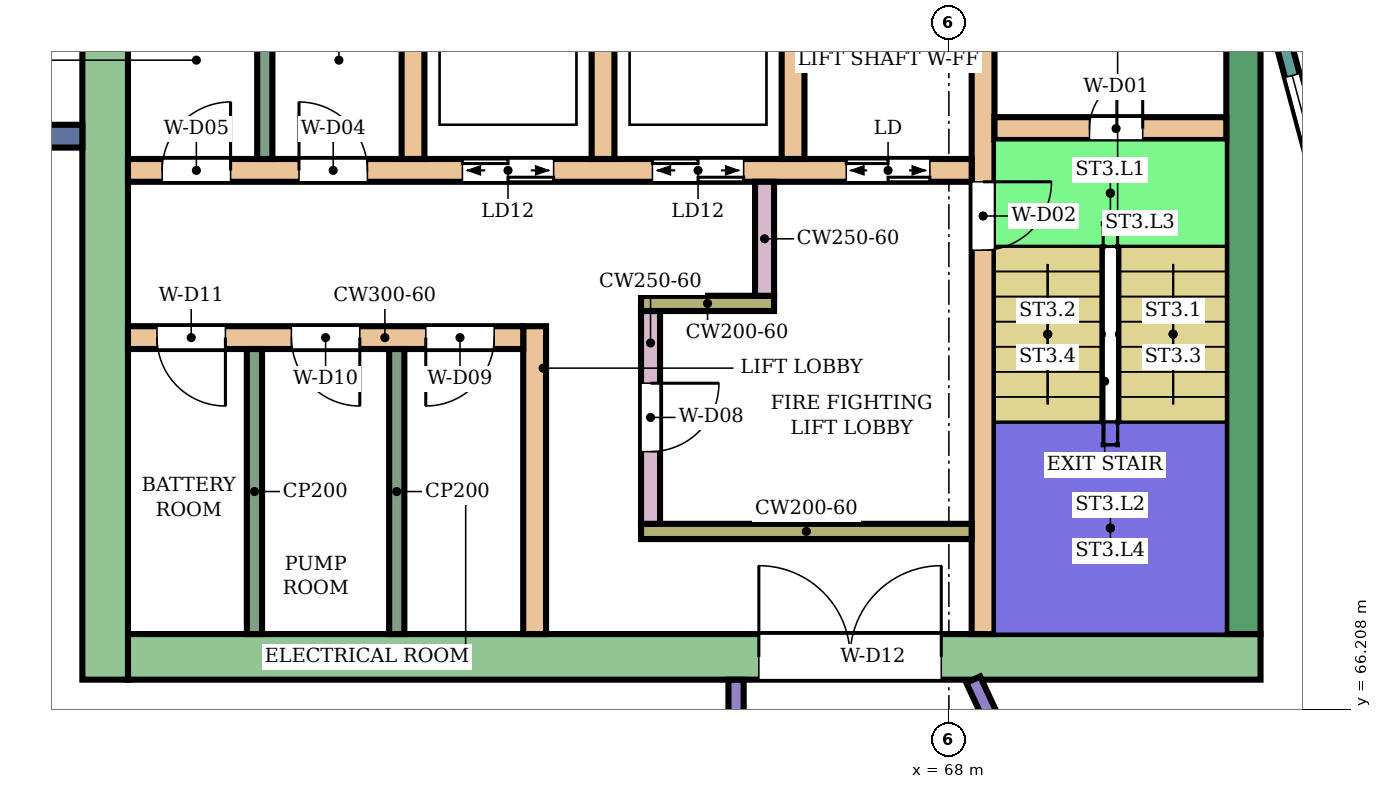
"""IFC4 building model, lengths in metres.
Left out: names, types, materials, properties, quantities, classifications, styles, units other than length and angle.
Written with IfcOpenShell. Run it as: python <this file> out.ifc"""

import sys

from ifc_helpers import new_model, si_unit, direction, frame, frame_2d, origin, place, context, subcontext, project, spatial, rectangle, extrude, element, fill, save


model = new_model("IFC4")
c1 = context("Model", 3, precision=1e-05, world=origin(), true_north=direction((0.0, 1.0)))
c2 = subcontext(c1, "Body", "Model", "MODEL_VIEW")
j1 = project(units=[si_unit("LENGTHUNIT", "METRE"), si_unit("PLANEANGLEUNIT", "RADIAN")], contexts=[c1])
p1 = place(None, origin())
s1 = spatial("IfcSite", under=j1, at=p1, CompositionType="ELEMENT")
p2 = place(p1, origin())
s2 = spatial("IfcBuilding", under=s1, at=p2, CompositionType="ELEMENT")
p3 = place(p2, frame((0.0, 0.0, 206.9)))
s3 = spatial("IfcBuildingStorey", under=s2, at=p3, CompositionType="ELEMENT", Elevation=206.9)
p4 = place(p3, frame((72.1, 66.9, 0.0), z_axis=(0.0, 0.0, 1.0), x_axis=(-1.0, 0.0, 0.0)))
e1 = element("IfcWall", 1, at=p4, inside=s3, PredefinedType="SHEAR", context=c2, shape_type="SweptSolid", body=[
    extrude(rectangle(XDim=14.9, YDim=0.6, at=frame_2d((7.45, 0.0))), origin(), (0.0, 0.0, 1.0), 5.28),
])
p5 = place(p4, frame((4.2, 0.0, 0.0)))
e2 = element("IfcOpeningElement", 2, at=p5, cuts=e1, PredefinedType="OPENING", context=c2, shape_type="SweptSolid", body=[
    extrude(rectangle(XDim=2.4, YDim=2.4, at=frame_2d((1.2, 1.2))), frame((0.0, 0.31, 0.0), z_axis=(0.0, -1.0, 0.0), x_axis=(1.0, 0.0, 0.0)), (0.0, 0.0, 1.0), 0.62),
])
p6 = place(p3, frame((71.875, 75.0, 0.0), z_axis=(0.0, 0.0, 1.0), x_axis=(0.0, -1.0, 0.0)))
e3 = element("IfcWall", 3, at=p6, inside=s3, PredefinedType="SHEAR", context=c2, shape_type="SweptSolid", body=[
    extrude(rectangle(XDim=7.8, YDim=0.45, at=frame_2d((3.9, 0.0))), origin(), (0.0, 0.0, 1.0), 5.28),
])
p7 = place(p3, frame((56.9, 83.4, 0.0), z_axis=(0.0, 0.0, 1.0), x_axis=(0.0, -1.0, 0.0)))
e4 = element("IfcWall", 4, at=p7, inside=s3, PredefinedType="SHEAR", context=c2, shape_type="SweptSolid", body=[
    extrude(rectangle(XDim=16.8, YDim=0.6, at=frame_2d((8.4, 0.0))), origin(), (0.0, 0.0, 1.0), 5.28),
])
p8 = place(p3, frame((68.45, 75.0, 0.0), z_axis=(0.0, 0.0, 1.0), x_axis=(0.0, -1.0, 0.0)))
e5 = element("IfcWall", 5, at=p8, inside=s3, PredefinedType="SHEAR", context=c2, shape_type="SweptSolid", body=[
    extrude(rectangle(XDim=7.8, YDim=0.3, at=frame_2d((3.9, 0.0))), origin(), (0.0, 0.0, 1.0), 5.28),
])
p9 = place(p8, frame((1.85, 0.0, 0.0)))
e6 = element("IfcOpeningElement", 6, at=p9, cuts=e5, PredefinedType="OPENING", context=c2, shape_type="SweptSolid", body=[
    extrude(rectangle(XDim=0.9, YDim=2.1, at=frame_2d((0.45, 1.05))), frame((0.0, 0.16, 0.0), z_axis=(0.0, -1.0, 0.0), x_axis=(1.0, 0.0, 0.0)), (0.0, 0.0, 1.0), 0.32),
])
p10 = place(p3, frame((71.65, 73.85, 0.0), z_axis=(0.0, 0.0, 1.0), x_axis=(-1.0, 0.0, 0.0)))
e7 = element("IfcWall", 7, at=p10, inside=s3, PredefinedType="SHEAR", context=c2, shape_type="SweptSolid", body=[
    extrude(rectangle(XDim=3.05, YDim=0.3, at=frame_2d((1.525, 0.0))), origin(), (0.0, 0.0, 1.0), 5.28),
])
p11 = place(p10, frame((1.1, 0.0, 0.0)))
e8 = element("IfcOpeningElement", 8, at=p11, cuts=e7, PredefinedType="OPENING", context=c2, shape_type="SweptSolid", body=[
    extrude(rectangle(XDim=0.7, YDim=2.0, at=frame_2d((0.35, 1.0))), frame((0.0, 0.16, 0.0), z_axis=(0.0, -1.0, 0.0), x_axis=(1.0, 0.0, 0.0)), (0.0, 0.0, 1.0), 0.32),
])
p12 = place(p3, frame((68.3, 73.3, 0.0), z_axis=(0.0, 0.0, 1.0), x_axis=(-1.0, 0.0, 0.0)))
e9 = element("IfcWall", 9, at=p12, inside=s3, PredefinedType="SHEAR", context=c2, shape_type="SweptSolid", body=[
    extrude(rectangle(XDim=11.1, YDim=0.3, at=frame_2d((5.55, 0.0))), origin(), (0.0, 0.0, 1.0), 5.28),
])
p13 = place(p12, frame((0.55, 0.0, 0.0)))
e10 = element("IfcOpeningElement", 10, at=p13, cuts=e9, PredefinedType="OPENING", context=c2, shape_type="SweptSolid", body=[
    extrude(rectangle(XDim=1.1, YDim=2.1, at=frame_2d((0.55, 1.05))), frame((0.0, 0.16, 0.0), z_axis=(0.0, -1.0, 0.0), x_axis=(1.0, 0.0, 0.0)), (0.0, 0.0, 1.0), 0.32),
])
p14 = place(p12, frame((3.0, 0.0, 0.0)))
e11 = element("IfcOpeningElement", 11, at=p14, cuts=e9, PredefinedType="OPENING", context=c2, shape_type="SweptSolid", body=[
    extrude(rectangle(XDim=1.2, YDim=2.1, at=frame_2d((0.6, 1.05))), frame((0.0, 0.16, 0.0), z_axis=(0.0, -1.0, 0.0), x_axis=(1.0, 0.0, 0.0)), (0.0, 0.0, 1.0), 0.32),
])
p15 = place(p12, frame((5.5, 0.0, 0.0)))
e12 = element("IfcOpeningElement", 12, at=p15, cuts=e9, PredefinedType="OPENING", context=c2, shape_type="SweptSolid", body=[
    extrude(rectangle(XDim=1.2, YDim=2.1, at=frame_2d((0.6, 1.05))), frame((0.0, 0.16, 0.0), z_axis=(0.0, -1.0, 0.0), x_axis=(1.0, 0.0, 0.0)), (0.0, 0.0, 1.0), 0.32),
])
p16 = place(p12, frame((7.95, 0.0, 0.0)))
e13 = element("IfcOpeningElement", 13, at=p16, cuts=e9, PredefinedType="OPENING", context=c2, shape_type="SweptSolid", body=[
    extrude(rectangle(XDim=0.9, YDim=2.1, at=frame_2d((0.45, 1.05))), frame((0.0, 0.16, 0.0), z_axis=(0.0, -1.0, 0.0), x_axis=(1.0, 0.0, 0.0)), (0.0, 0.0, 1.0), 0.32),
])
p17 = place(p12, frame((9.75, 0.0, 0.0)))
e14 = element("IfcOpeningElement", 14, at=p17, cuts=e9, PredefinedType="OPENING", context=c2, shape_type="SweptSolid", body=[
    extrude(rectangle(XDim=0.9, YDim=2.1, at=frame_2d((0.45, 1.05))), frame((0.0, 0.16, 0.0), z_axis=(0.0, -1.0, 0.0), x_axis=(1.0, 0.0, 0.0)), (0.0, 0.0, 1.0), 0.32),
])
for number, where, z_axis, x_axis in (
    (15, (65.95, 76.0, 0.0), (0.0, 0.0, 1.0), (0.0, -1.0, 0.0)),
    (16, (63.45, 76.0, 0.0), (0.0, 0.0, 1.0), (0.0, -1.0, 0.0)),
    (17, (60.95, 76.0, 0.0), (0.0, 0.0, 1.0), (0.0, -1.0, 0.0)),
):
    element("IfcWall", number, at=place(p3, frame(where, z_axis=z_axis, x_axis=x_axis)), inside=s3, PredefinedType="SHEAR", context=c2, shape_type="SweptSolid", body=[
        extrude(rectangle(XDim=2.55, YDim=0.3, at=frame_2d((1.275, 0.0))), origin(), (0.0, 0.0, 1.0), 5.28),
    ])
p18 = place(p3, frame((68.3, 68.55, 0.0), z_axis=(0.0, 0.0, 1.0), x_axis=(-1.0, 0.0, 0.0)))
e18 = element("IfcWall", 18, at=p18, inside=s3, PredefinedType="SHEAR", context=c2, shape_type="SweptSolid", body=[
    extrude(rectangle(XDim=4.35, YDim=0.2, at=frame_2d((2.175, 0.0))), origin(), (0.0, 0.0, 1.0), 5.28),
])
p19 = place(p3, frame((64.075, 71.45, 0.0), z_axis=(0.0, 0.0, 1.0), x_axis=(0.0, -1.0, 0.0)))
e19 = element("IfcWall", 19, at=p19, inside=s3, PredefinedType="SHEAR", context=c2, shape_type="SweptSolid", body=[
    extrude(rectangle(XDim=2.8, YDim=0.25, at=frame_2d((1.4, 0.0))), origin(), (0.0, 0.0, 1.0), 5.28),
])
p20 = place(p19, frame((0.95, 0.0, 0.0)))
e20 = element("IfcOpeningElement", 20, at=p20, cuts=e19, PredefinedType="OPENING", context=c2, shape_type="SweptSolid", body=[
    extrude(rectangle(XDim=0.9, YDim=2.1, at=frame_2d((0.45, 1.05))), frame((0.0, 0.135, 0.0), z_axis=(0.0, -1.0, 0.0), x_axis=(1.0, 0.0, 0.0)), (0.0, 0.0, 1.0), 0.27),
])
p21 = place(p3, frame((65.7, 71.55, 0.0), z_axis=(0.0, 0.0, 1.0), x_axis=(-1.0, 0.0, 0.0)))
e21 = element("IfcWall", 21, at=p21, inside=s3, PredefinedType="SHEAR", context=c2, shape_type="SweptSolid", body=[
    extrude(rectangle(XDim=1.75, YDim=0.2, at=frame_2d((0.875, 0.0))), origin(), (0.0, 0.0, 1.0), 5.28),
])
p22 = place(p3, frame((65.575, 73.15, 0.0), z_axis=(0.0, 0.0, 1.0), x_axis=(0.0, -1.0, 0.0)))
e22 = element("IfcWall", 22, at=p22, inside=s3, PredefinedType="SHEAR", context=c2, shape_type="SweptSolid", body=[
    extrude(rectangle(XDim=1.5, YDim=0.25, at=frame_2d((0.75, 0.0))), origin(), (0.0, 0.0, 1.0), 5.28),
])
p23 = place(p3, frame((62.55, 71.25, 0.0), z_axis=(0.0, 0.0, 1.0), x_axis=(0.0, -1.0, 0.0)))
e23 = element("IfcWall", 23, at=p23, inside=s3, PredefinedType="SHEAR", context=c2, shape_type="SweptSolid", body=[
    extrude(rectangle(XDim=4.05, YDim=0.3, at=frame_2d((2.025, 0.0))), origin(), (0.0, 0.0, 1.0), 5.28),
])
p24 = place(p3, frame((62.4, 71.1, 0.0), z_axis=(0.0, 0.0, 1.0), x_axis=(-1.0, 0.0, 0.0)))
e24 = element("IfcWall", 24, at=p24, inside=s3, PredefinedType="SHEAR", context=c2, shape_type="SweptSolid", body=[
    extrude(rectangle(XDim=5.2, YDim=0.3, at=frame_2d((2.6, 0.0))), origin(), (0.0, 0.0, 1.0), 5.28),
])
p25 = place(p24, frame((0.382, 0.0, 0.0)))
e25 = element("IfcOpeningElement", 25, at=p25, cuts=e24, PredefinedType="OPENING", context=c2, shape_type="SweptSolid", body=[
    extrude(rectangle(XDim=0.9, YDim=2.1, at=frame_2d((0.45, 1.05))), frame((0.0, 0.16, 0.0), z_axis=(0.0, -1.0, 0.0), x_axis=(1.0, 0.0, 0.0)), (0.0, 0.0, 1.0), 0.32),
])
p26 = place(p24, frame((2.15, 0.0, 0.0)))
e26 = element("IfcOpeningElement", 26, at=p26, cuts=e24, PredefinedType="OPENING", context=c2, shape_type="SweptSolid", body=[
    extrude(rectangle(XDim=0.9, YDim=2.1, at=frame_2d((0.45, 1.05))), frame((0.0, 0.16, 0.0), z_axis=(0.0, -1.0, 0.0), x_axis=(1.0, 0.0, 0.0)), (0.0, 0.0, 1.0), 0.32),
])
p27 = place(p24, frame((3.918, 0.0, 0.0)))
e27 = element("IfcOpeningElement", 27, at=p27, cuts=e24, PredefinedType="OPENING", context=c2, shape_type="SweptSolid", body=[
    extrude(rectangle(XDim=0.9, YDim=2.1, at=frame_2d((0.45, 1.05))), frame((0.0, 0.16, 0.0), z_axis=(0.0, -1.0, 0.0), x_axis=(1.0, 0.0, 0.0)), (0.0, 0.0, 1.0), 0.32),
])
p28 = place(p3, frame((56.6, 73.75, 0.0), z_axis=(0.0, 0.0, 1.0), x_axis=(-1.0, 0.0, 0.0)))
e28 = element("IfcWall", 28, at=p28, inside=s3, PredefinedType="NOTDEFINED", context=c2, shape_type="SweptSolid", body=[
    extrude(rectangle(XDim=2.416, YDim=0.3, at=frame_2d((1.208, 0.0))), origin(), (0.0, 0.0, 1.0), 5.6),
])
p29 = place(p3, frame((72.396, 75.0, 0.0), z_axis=(0.0, 0.0, 1.0), x_axis=(0.258789828301, -0.965933654434, 0.0)))
e29 = element("IfcWall", 29, at=p29, inside=s3, PredefinedType="NOTDEFINED", context=c2, shape_type="SweptSolid", body=[
    extrude(rectangle(XDim=3.936, YDim=0.2, at=frame_2d((1.968, 0.0))), origin(), (0.0, 0.0, 1.0), 5.6),
])
p30 = place(p29, frame((0.468, 0.0, 0.9)))
e30 = element("IfcOpeningElement", 30, at=p30, cuts=e29, PredefinedType="OPENING", context=c2, shape_type="SweptSolid", body=[
    extrude(rectangle(XDim=3.0, YDim=2.3, at=frame_2d((1.5, 1.15))), frame((0.0, 0.11, 0.0), z_axis=(0.0, -1.0, 0.0), x_axis=(1.0, 0.0, 0.0)), (0.0, 0.0, 1.0), 0.22),
])
p31 = place(p3, frame((65.2, 65.2, 0.0), z_axis=(0.0, 0.0, 1.0), x_axis=(0.0, 1.0, 0.0)))
e31 = element("IfcWall", 31, at=p31, inside=s3, PredefinedType="PARTITIONING", context=c2, shape_type="SweptSolid", body=[
    extrude(rectangle(XDim=1.399, YDim=0.2, at=frame_2d((0.7, 0.0))), origin(), (0.0, 0.0, 1.0), 5.15),
])
p32 = place(p3, frame((68.32, 66.6, 0.0), z_axis=(0.0, 0.0, 1.0), x_axis=(0.422061116547, -0.90656737968, 0.0)))
e32 = element("IfcWall", 32, at=p32, inside=s3, PredefinedType="PARTITIONING", context=c2, shape_type="SweptSolid", body=[
    extrude(rectangle(XDim=7.46, YDim=0.2, at=frame_2d((3.73, 0.0))), origin(), (0.0, 0.0, 1.0), 5.15),
])
p33 = place(p32, frame((3.022, 0.0, 0.0)))
e33 = element("IfcOpeningElement", 33, at=p33, cuts=e32, PredefinedType="OPENING", context=c2, shape_type="SweptSolid", body=[
    extrude(rectangle(XDim=1.2, YDim=2.4, at=frame_2d((0.6, 1.2))), frame((0.0, 0.11, 0.0), z_axis=(0.0, -1.0, 0.0), x_axis=(1.0, 0.0, 0.0)), (0.0, 0.0, 1.0), 0.22),
])
p34 = place(p3, frame((71.463, 60.216, 0.0), z_axis=(0.0, 0.0, 1.0), x_axis=(0.500032835289, 0.866006445491, 0.0)))
e34 = element("IfcWall", 34, at=p34, inside=s3, PredefinedType="PARTITIONING", context=c2, shape_type="SweptSolid", body=[
    extrude(rectangle(XDim=9.373, YDim=0.2, at=frame_2d((4.687, 0.0))), origin(), (0.0, 0.0, 1.0), 5.15),
])
p35 = place(p3, frame((59.0, 76.0, 0.0), z_axis=(0.0, 0.0, 1.0), x_axis=(0.0, -1.0, 0.0)))
e35 = element("IfcWall", 35, at=p35, inside=s3, PredefinedType="PARTITIONING", context=c2, shape_type="SweptSolid", body=[
    extrude(rectangle(XDim=2.55, YDim=0.2, at=frame_2d((1.275, 0.0))), origin(), (0.0, 0.0, 1.0), 5.28),
])
for number, where, z_axis, x_axis in (
    (36, (60.736, 70.95, 0.0), (0.0, 0.0, 1.0), (0.0, -1.0, 0.0)),
    (37, (58.864, 70.95, 0.0), (0.0, 0.0, 1.0), (0.0, -1.0, 0.0)),
):
    element("IfcWall", number, at=place(p3, frame(where, z_axis=z_axis, x_axis=x_axis)), inside=s3, PredefinedType="PARTITIONING", context=c2, shape_type="SweptSolid", body=[
        extrude(rectangle(XDim=3.75, YDim=0.2, at=frame_2d((1.875, 0.0))), origin(), (0.0, 0.0, 1.0), 5.28),
    ])
p36 = place(p30, origin())
e38 = element("IfcWindow", 38, at=p36, inside=s3, PartitioningType="SINGLE_PANEL", PredefinedType="WINDOW", context=c2, shape_type="SweptSolid", body=[
    extrude(rectangle(XDim=3.0, YDim=2.3, at=frame_2d((1.5, 1.15))), frame((0.0, 0.03, 0.0), z_axis=(0.0, -1.0, 0.0), x_axis=(1.0, 0.0, 0.0)), (0.0, 0.0, 1.0), 0.06),
])
fill(e30, e38)
p37 = place(p11, frame((0.7, 0.0, 0.0), z_axis=(0.0, 0.0, 1.0), x_axis=(-1.0, 0.0, 0.0)))
e39 = element("IfcDoor", 39, at=p37, inside=s3, OperationType="SINGLE_SWING_RIGHT", PredefinedType="DOOR", context=c2, shape_type="SweptSolid", body=[
    extrude(rectangle(XDim=0.7, YDim=2.0, at=frame_2d((0.35, 1.0))), frame((0.0, 0.025, 0.0), z_axis=(0.0, -1.0, 0.0), x_axis=(1.0, 0.0, 0.0)), (0.0, 0.0, 1.0), 0.05),
])
fill(e8, e39)
p38 = place(p9, origin())
e40 = element("IfcDoor", 40, at=p38, inside=s3, OperationType="SINGLE_SWING_LEFT", PredefinedType="DOOR", context=c2, shape_type="SweptSolid", body=[
    extrude(rectangle(XDim=0.9, YDim=2.1, at=frame_2d((0.45, 1.05))), frame((0.0, 0.025, 0.0), z_axis=(0.0, -1.0, 0.0), x_axis=(1.0, 0.0, 0.0)), (0.0, 0.0, 1.0), 0.05),
])
fill(e6, e40)
p39 = place(p13, origin())
e41 = element("IfcDoor", 41, at=p39, inside=s3, OperationType="DOUBLE_DOOR_SLIDING", PredefinedType="DOOR", context=c2, shape_type="SweptSolid", body=[
    extrude(rectangle(XDim=1.1, YDim=2.1, at=frame_2d((0.55, 1.05))), frame((0.0, 0.025, 0.0), z_axis=(0.0, -1.0, 0.0), x_axis=(1.0, 0.0, 0.0)), (0.0, 0.0, 1.0), 0.05),
])
fill(e10, e41)
p40 = place(p14, origin())
e42 = element("IfcDoor", 42, at=p40, inside=s3, OperationType="DOUBLE_DOOR_SLIDING", PredefinedType="DOOR", context=c2, shape_type="SweptSolid", body=[
    extrude(rectangle(XDim=1.2, YDim=2.1, at=frame_2d((0.6, 1.05))), frame((0.0, 0.025, 0.0), z_axis=(0.0, -1.0, 0.0), x_axis=(1.0, 0.0, 0.0)), (0.0, 0.0, 1.0), 0.05),
])
fill(e11, e42)
p41 = place(p15, origin())
e43 = element("IfcDoor", 43, at=p41, inside=s3, OperationType="DOUBLE_DOOR_SLIDING", PredefinedType="DOOR", context=c2, shape_type="SweptSolid", body=[
    extrude(rectangle(XDim=1.2, YDim=2.1, at=frame_2d((0.6, 1.05))), frame((0.0, 0.025, 0.0), z_axis=(0.0, -1.0, 0.0), x_axis=(1.0, 0.0, 0.0)), (0.0, 0.0, 1.0), 0.05),
])
fill(e12, e43)
p42 = place(p16, frame((0.9, 0.0, 0.0), z_axis=(0.0, 0.0, 1.0), x_axis=(-1.0, 0.0, 0.0)))
e44 = element("IfcDoor", 44, at=p42, inside=s3, OperationType="SINGLE_SWING_LEFT", PredefinedType="DOOR", context=c2, shape_type="SweptSolid", body=[
    extrude(rectangle(XDim=0.9, YDim=2.1, at=frame_2d((0.45, 1.05))), frame((0.0, 0.025, 0.0), z_axis=(0.0, -1.0, 0.0), x_axis=(1.0, 0.0, 0.0)), (0.0, 0.0, 1.0), 0.05),
])
fill(e13, e44)
p43 = place(p17, frame((0.9, 0.0, 0.0), z_axis=(0.0, 0.0, 1.0), x_axis=(-1.0, 0.0, 0.0)))
e45 = element("IfcDoor", 45, at=p43, inside=s3, OperationType="SINGLE_SWING_RIGHT", PredefinedType="DOOR", context=c2, shape_type="SweptSolid", body=[
    extrude(rectangle(XDim=0.9, YDim=2.1, at=frame_2d((0.45, 1.05))), frame((0.0, 0.025, 0.0), z_axis=(0.0, -1.0, 0.0), x_axis=(1.0, 0.0, 0.0)), (0.0, 0.0, 1.0), 0.05),
])
fill(e14, e45)
p44 = place(p20, origin())
e46 = element("IfcDoor", 46, at=p44, inside=s3, OperationType="SINGLE_SWING_LEFT", PredefinedType="DOOR", context=c2, shape_type="SweptSolid", body=[
    extrude(rectangle(XDim=0.9, YDim=2.1, at=frame_2d((0.45, 1.05))), frame((0.0, 0.025, 0.0), z_axis=(0.0, -1.0, 0.0), x_axis=(1.0, 0.0, 0.0)), (0.0, 0.0, 1.0), 0.05),
])
fill(e20, e46)
p45 = place(p25, origin())
e47 = element("IfcDoor", 47, at=p45, inside=s3, OperationType="SINGLE_SWING_RIGHT", PredefinedType="DOOR", context=c2, shape_type="SweptSolid", body=[
    extrude(rectangle(XDim=0.9, YDim=2.1, at=frame_2d((0.45, 1.05))), frame((0.0, 0.025, 0.0), z_axis=(0.0, -1.0, 0.0), x_axis=(1.0, 0.0, 0.0)), (0.0, 0.0, 1.0), 0.05),
])
fill(e25, e47)
p46 = place(p26, origin())
e48 = element("IfcDoor", 48, at=p46, inside=s3, OperationType="SINGLE_SWING_LEFT", PredefinedType="DOOR", context=c2, shape_type="SweptSolid", body=[
    extrude(rectangle(XDim=0.9, YDim=2.1, at=frame_2d((0.45, 1.05))), frame((0.0, 0.025, 0.0), z_axis=(0.0, -1.0, 0.0), x_axis=(1.0, 0.0, 0.0)), (0.0, 0.0, 1.0), 0.05),
])
fill(e26, e48)
p47 = place(p27, origin())
e49 = element("IfcDoor", 49, at=p47, inside=s3, OperationType="SINGLE_SWING_LEFT", PredefinedType="DOOR", context=c2, shape_type="SweptSolid", body=[
    extrude(rectangle(XDim=0.9, YDim=2.1, at=frame_2d((0.45, 1.05))), frame((0.0, 0.025, 0.0), z_axis=(0.0, -1.0, 0.0), x_axis=(1.0, 0.0, 0.0)), (0.0, 0.0, 1.0), 0.05),
])
fill(e27, e49)
p48 = place(p5, frame((2.4, 0.0, 0.0), z_axis=(0.0, 0.0, 1.0), x_axis=(-1.0, 0.0, 0.0)))
e50 = element("IfcDoor", 50, at=p48, inside=s3, OperationType="DOUBLE_DOOR_SINGLE_SWING", PredefinedType="DOOR", context=c2, shape_type="SweptSolid", body=[
    extrude(rectangle(XDim=2.4, YDim=2.4, at=frame_2d((1.2, 1.2))), frame((0.0, 0.025, 0.0), z_axis=(0.0, -1.0, 0.0), x_axis=(1.0, 0.0, 0.0)), (0.0, 0.0, 1.0), 0.05),
])
fill(e2, e50)
save(model, sys.argv[1])
